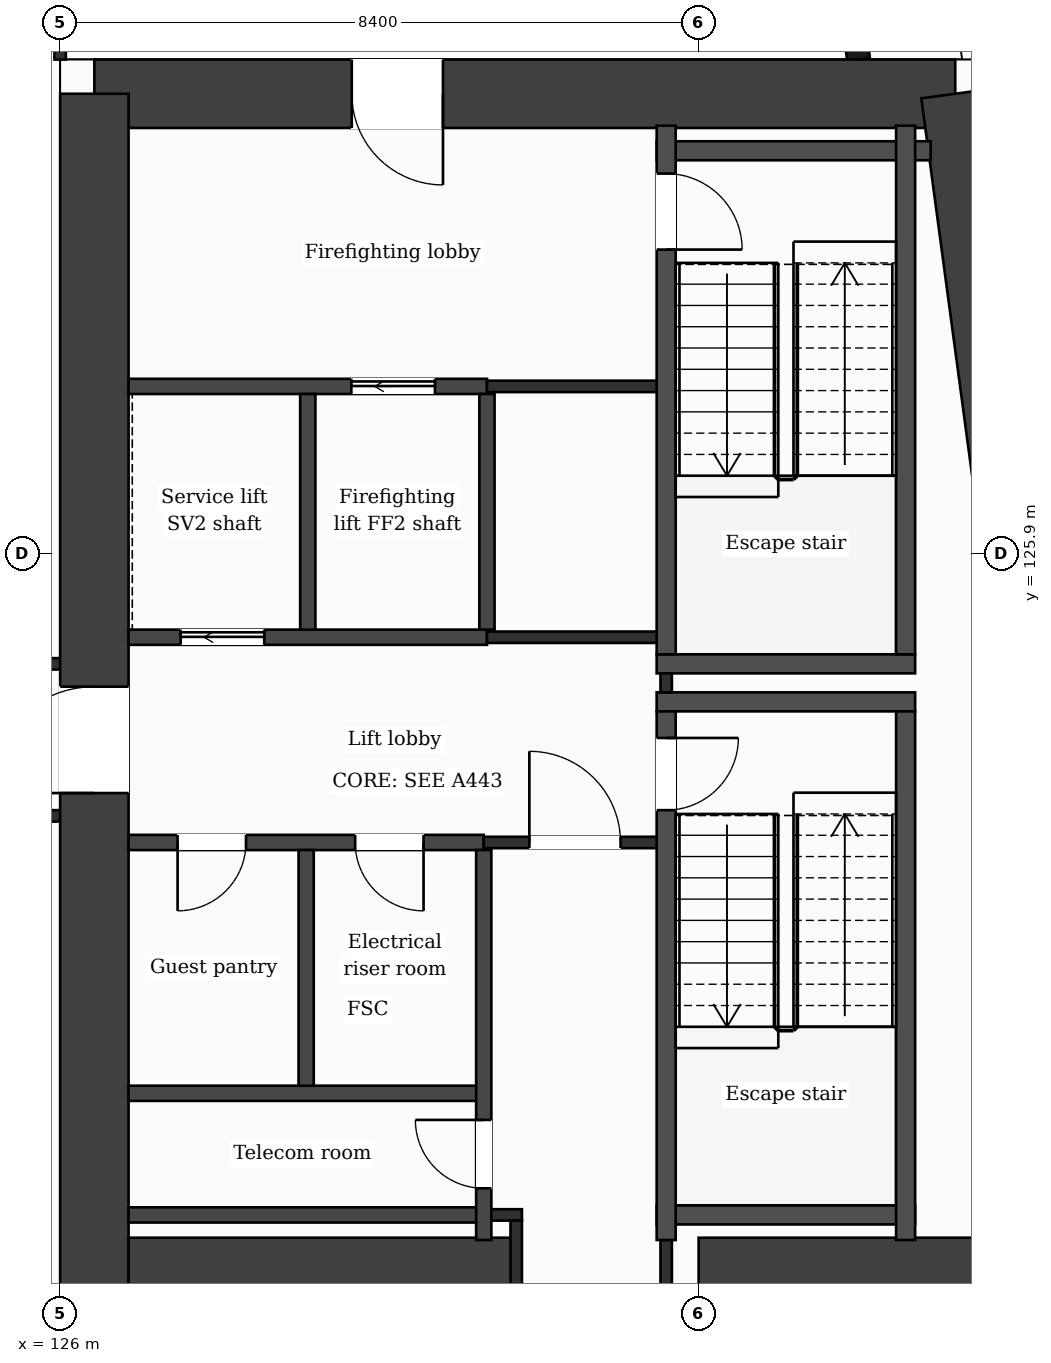
"""IFC4 building model, lengths in metres.
Left out: names, types, materials, properties, quantities, classifications, styles, units other than length and angle.
Written with IfcOpenShell. Run it as: python <this file> out.ifc"""

import sys

from ifc_helpers import new_model, si_unit, direction, frame, frame_2d, origin, place, context, subcontext, project, spatial, rectangle, extrude, element, fill, save


model = new_model("IFC4")
c1 = context("Model", 3, precision=1e-05, world=origin(), true_north=direction((0.0, 1.0)))
c2 = subcontext(c1, "Body", "Model", "MODEL_VIEW")
j1 = project(units=[si_unit("LENGTHUNIT", "METRE"), si_unit("PLANEANGLEUNIT", "RADIAN")], contexts=[c1])
p1 = place(None, origin())
s1 = spatial("IfcSite", under=j1, at=p1, CompositionType="ELEMENT")
p2 = place(p1, origin())
s2 = spatial("IfcBuilding", under=s1, at=p2, CompositionType="ELEMENT")
p3 = place(p2, frame((0.0, 0.0, 177.4)))
s3 = spatial("IfcBuildingStorey", under=s2, at=p3, CompositionType="ELEMENT", Elevation=177.4)
p4 = place(p3, frame((126.45, 131.95, 0.0), z_axis=(0.0, 0.0, 1.0), x_axis=(1.0, 0.0, 0.0)))
e1 = element("IfcWall", 1, at=p4, inside=s3, PredefinedType="SHEAR", context=c2, shape_type="SweptSolid", body=[
    extrude(rectangle(XDim=11.326, YDim=0.9, at=frame_2d((5.663, 0.0))), origin(), (0.0, 0.0, 1.0), 3.7),
])
p5 = place(p4, frame((3.386, 0.0, 0.0)))
e2 = element("IfcOpeningElement", 2, at=p5, cuts=e1, PredefinedType="OPENING", context=c2, shape_type="SweptSolid", body=[
    extrude(rectangle(XDim=1.2, YDim=2.1, at=frame_2d((0.6, 1.05))), frame((0.0, 0.46, 0.0), z_axis=(0.0, -1.0, 0.0), x_axis=(1.0, 0.0, 0.0)), (0.0, 0.0, 1.0), 0.92),
])
p6 = place(p3, frame((137.776, 131.95, 0.0), z_axis=(0.0, 0.0, 1.0), x_axis=(0.133421759112, -0.991059349482, 0.0)))
e3 = element("IfcWall", 3, at=p6, inside=s3, PredefinedType="SHEAR", context=c2, shape_type="SweptSolid", body=[
    extrude(rectangle(XDim=21.29, YDim=0.9, at=frame_2d((10.645, 0.0))), origin(), (0.0, 0.0, 1.0), 3.7),
])
p7 = place(p3, frame((126.45, 110.85, 0.0), z_axis=(0.0, 0.0, 1.0), x_axis=(0.0, 1.0, 0.0)))
e4 = element("IfcWall", 4, at=p7, inside=s3, PredefinedType="SHEAR", context=c2, shape_type="SweptSolid", body=[
    extrude(rectangle(XDim=21.1, YDim=0.9, at=frame_2d((10.55, 0.0))), origin(), (0.0, 0.0, 1.0), 3.7),
])
p8 = place(p7, frame((11.9, 0.0, 0.0)))
e5 = element("IfcOpeningElement", 5, at=p8, cuts=e4, PredefinedType="OPENING", context=c2, shape_type="SweptSolid", body=[
    extrude(rectangle(XDim=1.4, YDim=2.1, at=frame_2d((0.7, 1.05))), frame((0.0, 0.46, 0.0), z_axis=(0.0, -1.0, 0.0), x_axis=(1.0, 0.0, 0.0)), (0.0, 0.0, 1.0), 0.92),
])
p9 = place(p3, frame((126.9, 116.45, 0.0), z_axis=(0.0, 0.0, 1.0), x_axis=(1.0, 0.0, 0.0)))
e6 = element("IfcWall", 6, at=p9, inside=s3, PredefinedType="SHEAR", context=c2, shape_type="SweptSolid", body=[
    extrude(rectangle(XDim=5.1, YDim=0.9, at=frame_2d((2.55, 0.0))), origin(), (0.0, 0.0, 1.0), 3.7),
])
p10 = place(p3, frame((134.4, 116.45, 0.0), z_axis=(0.0, 0.0, 1.0), x_axis=(1.0, 0.0, 0.0)))
e7 = element("IfcWall", 7, at=p10, inside=s3, PredefinedType="SHEAR", context=c2, shape_type="SweptSolid", body=[
    extrude(rectangle(XDim=5.077, YDim=0.9, at=frame_2d((2.539, 0.0))), origin(), (0.0, 0.0, 1.0), 3.7),
])
p11 = place(p3, frame((136.504, 132.4, 0.0), z_axis=(0.0, 0.0, 1.0), x_axis=(-0.133399697462, 0.99106231929, 0.0)))
e8 = element("IfcWall", 8, at=p11, inside=s3, PredefinedType="SOLIDWALL", context=c2, shape_type="SweptSolid", body=[
    extrude(rectangle(XDim=6.74, YDim=0.3, at=frame_2d((3.37, 0.0))), origin(), (0.0, 0.0, 1.0), 3.38),
])
p12 = place(p11, frame((1.115, 0.0, 0.0)))
e9 = element("IfcOpeningElement", 9, at=p12, cuts=e8, PredefinedType="OPENING", context=c2, shape_type="SweptSolid", body=[
    extrude(rectangle(XDim=1.2, YDim=2.4, at=frame_2d((0.6, 1.2))), frame((0.0, 0.16, 0.0), z_axis=(0.0, -1.0, 0.0), x_axis=(1.0, 0.0, 0.0)), (0.0, 0.0, 1.0), 0.32),
])
p13 = place(p11, frame((3.835, 0.0, 0.9)))
e10 = element("IfcOpeningElement", 10, at=p13, cuts=e8, PredefinedType="OPENING", context=c2, shape_type="SweptSolid", body=[
    extrude(rectangle(XDim=2.4, YDim=2.1, at=frame_2d((1.2, 1.05))), frame((0.0, 0.16, 0.0), z_axis=(0.0, -1.0, 0.0), x_axis=(1.0, 0.0, 0.0)), (0.0, 0.0, 1.0), 0.32),
])
p14 = place(p3, frame((126.9, 117.2, 0.0), z_axis=(0.0, 0.0, 1.0), x_axis=(1.0, 0.0, 0.0)))
e11 = element("IfcWall", 11, at=p14, inside=s3, PredefinedType="PARTITIONING", context=c2, shape_type="SweptSolid", body=[
    extrude(rectangle(XDim=4.673, YDim=0.2, at=frame_2d((2.336, 0.0))), origin(), (0.0, 0.0, 1.0), 3.38),
])
p15 = place(p3, frame((131.573, 117.2, 0.0), z_axis=(0.0, 0.0, 1.0), x_axis=(1.0, 0.0, 0.0)))
e12 = element("IfcWall", 12, at=p15, inside=s3, PredefinedType="PARTITIONING", context=c2, shape_type="SweptSolid", body=[
    extrude(rectangle(XDim=0.502, YDim=0.15, at=frame_2d((0.251, 0.0))), origin(), (0.0, 0.0, 1.0), 3.38),
])
p16 = place(p3, frame((133.848, 117.2, 0.0), z_axis=(0.0, 0.0, 1.0), x_axis=(1.0, 0.0, 0.0)))
e13 = element("IfcWall", 13, at=p16, inside=s3, PredefinedType="PARTITIONING", context=c2, shape_type="SweptSolid", body=[
    extrude(rectangle(XDim=3.4, YDim=0.25, at=frame_2d((1.7, 0.0))), origin(), (0.0, 0.0, 1.0), 3.38),
])
p17 = place(p3, frame((126.9, 118.8, 0.0), z_axis=(0.0, 0.0, 1.0), x_axis=(1.0, 0.0, 0.0)))
e14 = element("IfcWall", 14, at=p17, inside=s3, PredefinedType="PARTITIONING", context=c2, shape_type="SweptSolid", body=[
    extrude(rectangle(XDim=4.673, YDim=0.2, at=frame_2d((2.336, 0.0))), origin(), (0.0, 0.0, 1.0), 3.38),
])
p18 = place(p3, frame((126.9, 122.1, 0.0), z_axis=(0.0, 0.0, 1.0), x_axis=(1.0, 0.0, 0.0)))
e15 = element("IfcWall", 15, at=p18, inside=s3, PredefinedType="PARTITIONING", context=c2, shape_type="SweptSolid", body=[
    extrude(rectangle(XDim=4.673, YDim=0.2, at=frame_2d((2.336, 0.0))), origin(), (0.0, 0.0, 1.0), 3.38),
])
p19 = place(p18, frame((2.981, 0.0, 0.0)))
e16 = element("IfcOpeningElement", 16, at=p19, cuts=e15, PredefinedType="OPENING", context=c2, shape_type="SweptSolid", body=[
    extrude(rectangle(XDim=0.9, YDim=2.1, at=frame_2d((0.45, 1.05))), frame((0.0, 0.11, 0.0), z_axis=(0.0, -1.0, 0.0), x_axis=(1.0, 0.0, 0.0)), (0.0, 0.0, 1.0), 0.22),
])
p20 = place(p18, frame((0.645, 0.0, 0.0)))
e17 = element("IfcOpeningElement", 17, at=p20, cuts=e15, PredefinedType="OPENING", context=c2, shape_type="SweptSolid", body=[
    extrude(rectangle(XDim=0.9, YDim=2.1, at=frame_2d((0.45, 1.05))), frame((0.0, 0.11, 0.0), z_axis=(0.0, -1.0, 0.0), x_axis=(1.0, 0.0, 0.0)), (0.0, 0.0, 1.0), 0.22),
])
p21 = place(p3, frame((131.573, 122.1, 0.0), z_axis=(0.0, 0.0, 1.0), x_axis=(1.0, 0.0, 0.0)))
e18 = element("IfcWall", 18, at=p21, inside=s3, PredefinedType="PARTITIONING", context=c2, shape_type="SweptSolid", body=[
    extrude(rectangle(XDim=2.4, YDim=0.15, at=frame_2d((1.2, 0.0))), origin(), (0.0, 0.0, 1.0), 3.38),
])
p22 = place(p21, frame((0.6, 0.0, 0.0)))
e19 = element("IfcOpeningElement", 19, at=p22, cuts=e18, PredefinedType="OPENING", context=c2, shape_type="SweptSolid", body=[
    extrude(rectangle(XDim=1.2, YDim=2.1, at=frame_2d((0.6, 1.05))), frame((0.0, 0.085, 0.0), z_axis=(0.0, -1.0, 0.0), x_axis=(1.0, 0.0, 0.0)), (0.0, 0.0, 1.0), 0.17),
])
p23 = place(p3, frame((100.8, 122.45, 0.0), z_axis=(0.0, 0.0, 1.0), x_axis=(1.0, 0.0, 0.0)))
e20 = element("IfcWall", 20, at=p23, inside=s3, PredefinedType="PARTITIONING", context=c2, shape_type="SweptSolid", body=[
    extrude(rectangle(XDim=25.2, YDim=0.15, at=frame_2d((12.6, 0.0))), origin(), (0.0, 0.0, 1.0), 3.38),
])
for number, where, z_axis, x_axis in (
    (21, (133.848, 123.95, 0.0), (0.0, 0.0, 1.0), (1.0, 0.0, 0.0)),
    (22, (133.848, 124.45, 0.0), (0.0, 0.0, 1.0), (1.0, 0.0, 0.0)),
):
    element("IfcWall", number, at=place(p3, frame(where, z_axis=z_axis, x_axis=x_axis)), inside=s3, PredefinedType="PARTITIONING", context=c2, shape_type="SweptSolid", body=[
        extrude(rectangle(XDim=3.4, YDim=0.25, at=frame_2d((1.7, 0.0))), origin(), (0.0, 0.0, 1.0), 3.38),
    ])
p24 = place(p3, frame((100.8, 124.45, 0.0), z_axis=(0.0, 0.0, 1.0), x_axis=(1.0, 0.0, 0.0)))
e23 = element("IfcWall", 23, at=p24, inside=s3, PredefinedType="PARTITIONING", context=c2, shape_type="SweptSolid", body=[
    extrude(rectangle(XDim=25.2, YDim=0.15, at=frame_2d((12.6, 0.0))), origin(), (0.0, 0.0, 1.0), 3.38),
])
p25 = place(p24, frame((0.975, 0.0, 0.0)))
e24 = element("IfcOpeningElement", 24, at=p25, cuts=e23, PredefinedType="OPENING", context=c2, shape_type="SweptSolid", body=[
    extrude(rectangle(XDim=1.0, YDim=2.1, at=frame_2d((0.5, 1.05))), frame((0.0, 0.085, 0.0), z_axis=(0.0, -1.0, 0.0), x_axis=(1.0, 0.0, 0.0)), (0.0, 0.0, 1.0), 0.17),
])
p26 = place(p24, frame((6.05, 0.0, 0.0)))
e25 = element("IfcOpeningElement", 25, at=p26, cuts=e23, PredefinedType="OPENING", context=c2, shape_type="SweptSolid", body=[
    extrude(rectangle(XDim=1.0, YDim=2.1, at=frame_2d((0.5, 1.05))), frame((0.0, 0.085, 0.0), z_axis=(0.0, -1.0, 0.0), x_axis=(1.0, 0.0, 0.0)), (0.0, 0.0, 1.0), 0.17),
])
p27 = place(p24, frame((9.27, 0.0, 0.0)))
e26 = element("IfcOpeningElement", 26, at=p27, cuts=e23, PredefinedType="OPENING", context=c2, shape_type="SweptSolid", body=[
    extrude(rectangle(XDim=1.0, YDim=2.1, at=frame_2d((0.5, 1.05))), frame((0.0, 0.085, 0.0), z_axis=(0.0, -1.0, 0.0), x_axis=(1.0, 0.0, 0.0)), (0.0, 0.0, 1.0), 0.17),
])
p28 = place(p24, frame((14.2, 0.0, 0.0)))
e27 = element("IfcOpeningElement", 27, at=p28, cuts=e23, PredefinedType="OPENING", context=c2, shape_type="SweptSolid", body=[
    extrude(rectangle(XDim=1.0, YDim=2.1, at=frame_2d((0.5, 1.05))), frame((0.0, 0.085, 0.0), z_axis=(0.0, -1.0, 0.0), x_axis=(1.0, 0.0, 0.0)), (0.0, 0.0, 1.0), 0.17),
])
p29 = place(p24, frame((18.825, 0.0, 0.0)))
e28 = element("IfcOpeningElement", 28, at=p29, cuts=e23, PredefinedType="OPENING", context=c2, shape_type="SweptSolid", body=[
    extrude(rectangle(XDim=1.0, YDim=2.1, at=frame_2d((0.5, 1.05))), frame((0.0, 0.085, 0.0), z_axis=(0.0, -1.0, 0.0), x_axis=(1.0, 0.0, 0.0)), (0.0, 0.0, 1.0), 0.17),
])
p30 = place(p3, frame((126.9, 124.8, 0.0), z_axis=(0.0, 0.0, 1.0), x_axis=(1.0, 0.0, 0.0)))
e29 = element("IfcWall", 29, at=p30, inside=s3, PredefinedType="PARTITIONING", context=c2, shape_type="SweptSolid", body=[
    extrude(rectangle(XDim=4.715, YDim=0.2, at=frame_2d((2.358, 0.0))), origin(), (0.0, 0.0, 1.0), 3.38),
])
p31 = place(p30, frame((0.685, 0.0, 0.0)))
e30 = element("IfcOpeningElement", 30, at=p31, cuts=e29, PredefinedType="OPENING", context=c2, shape_type="SweptSolid", body=[
    extrude(rectangle(XDim=1.1, YDim=2.1, at=frame_2d((0.55, 1.05))), frame((0.0, 0.11, 0.0), z_axis=(0.0, -1.0, 0.0), x_axis=(1.0, 0.0, 0.0)), (0.0, 0.0, 1.0), 0.22),
])
p32 = place(p3, frame((131.615, 124.8, 0.0), z_axis=(0.0, 0.0, 1.0), x_axis=(1.0, 0.0, 0.0)))
e31 = element("IfcWall", 31, at=p32, inside=s3, PredefinedType="PARTITIONING", context=c2, shape_type="SweptSolid", body=[
    extrude(rectangle(XDim=2.483, YDim=0.15, at=frame_2d((1.241, 0.0))), origin(), (0.0, 0.0, 1.0), 3.38),
])
p33 = place(p3, frame((126.9, 128.1, 0.0), z_axis=(0.0, 0.0, 1.0), x_axis=(1.0, 0.0, 0.0)))
e32 = element("IfcWall", 32, at=p33, inside=s3, PredefinedType="PARTITIONING", context=c2, shape_type="SweptSolid", body=[
    extrude(rectangle(XDim=4.715, YDim=0.2, at=frame_2d((2.358, 0.0))), origin(), (0.0, 0.0, 1.0), 3.38),
])
p34 = place(p33, frame((2.931, 0.0, 0.0)))
e33 = element("IfcOpeningElement", 33, at=p34, cuts=e32, PredefinedType="OPENING", context=c2, shape_type="SweptSolid", body=[
    extrude(rectangle(XDim=1.1, YDim=2.1, at=frame_2d((0.55, 1.05))), frame((0.0, 0.11, 0.0), z_axis=(0.0, -1.0, 0.0), x_axis=(1.0, 0.0, 0.0)), (0.0, 0.0, 1.0), 0.22),
])
p35 = place(p3, frame((131.615, 128.1, 0.0), z_axis=(0.0, 0.0, 1.0), x_axis=(1.0, 0.0, 0.0)))
e34 = element("IfcWall", 34, at=p35, inside=s3, PredefinedType="PARTITIONING", context=c2, shape_type="SweptSolid", body=[
    extrude(rectangle(XDim=2.358, YDim=0.15, at=frame_2d((1.179, 0.0))), origin(), (0.0, 0.0, 1.0), 3.38),
])
p36 = place(p3, frame((133.848, 131.2, 0.0), z_axis=(0.0, 0.0, 1.0), x_axis=(1.0, 0.0, 0.0)))
e35 = element("IfcWall", 35, at=p36, inside=s3, PredefinedType="PARTITIONING", context=c2, shape_type="SweptSolid", body=[
    extrude(rectangle(XDim=3.605, YDim=0.25, at=frame_2d((1.802, 0.0))), origin(), (0.0, 0.0, 1.0), 3.38),
])
p37 = place(p3, frame((126.0, 132.4, 0.0), z_axis=(0.0, 0.0, 1.0), x_axis=(0.0, 1.0, 0.0)))
e36 = element("IfcWall", 36, at=p37, inside=s3, PredefinedType="PARTITIONING", context=c2, shape_type="SweptSolid", body=[
    extrude(rectangle(XDim=1.325, YDim=0.15, at=frame_2d((0.663, 0.0))), origin(), (0.0, 0.0, 1.0), 3.38),
])
for number, where, z_axis, x_axis in (
    (37, (129.237, 118.9, 0.0), (0.0, 0.0, 1.0), (0.0, 1.0, 0.0)),
    (38, (129.258, 124.9, 0.0), (0.0, 0.0, 1.0), (0.0, 1.0, 0.0)),
):
    element("IfcWall", number, at=place(p3, frame(where, z_axis=z_axis, x_axis=x_axis)), inside=s3, PredefinedType="PARTITIONING", context=c2, shape_type="SweptSolid", body=[
        extrude(rectangle(XDim=3.1, YDim=0.2, at=frame_2d((1.55, 0.0))), origin(), (0.0, 0.0, 1.0), 3.38),
    ])
p38 = place(p3, frame((131.573, 116.87, 0.0), z_axis=(0.0, 0.0, 1.0), x_axis=(0.0, 1.0, 0.0)))
e39 = element("IfcWall", 39, at=p38, inside=s3, PredefinedType="PARTITIONING", context=c2, shape_type="SweptSolid", body=[
    extrude(rectangle(XDim=5.13, YDim=0.2, at=frame_2d((2.565, 0.0))), origin(), (0.0, 0.0, 1.0), 3.38),
])
p39 = place(p38, frame((0.68, 0.0, 0.0)))
e40 = element("IfcOpeningElement", 40, at=p39, cuts=e39, PredefinedType="OPENING", context=c2, shape_type="SweptSolid", body=[
    extrude(rectangle(XDim=0.9, YDim=2.1, at=frame_2d((0.45, 1.05))), frame((0.0, 0.11, 0.0), z_axis=(0.0, -1.0, 0.0), x_axis=(1.0, 0.0, 0.0)), (0.0, 0.0, 1.0), 0.22),
])
p40 = place(p3, frame((131.615, 124.9, 0.0), z_axis=(0.0, 0.0, 1.0), x_axis=(0.0, 1.0, 0.0)))
e41 = element("IfcWall", 41, at=p40, inside=s3, PredefinedType="PARTITIONING", context=c2, shape_type="SweptSolid", body=[
    extrude(rectangle(XDim=3.1, YDim=0.2, at=frame_2d((1.55, 0.0))), origin(), (0.0, 0.0, 1.0), 3.38),
])
p41 = place(p3, frame((132.0, 116.0, 0.0), z_axis=(0.0, 0.0, 1.0), x_axis=(0.0, 1.0, 0.0)))
e42 = element("IfcWall", 42, at=p41, inside=s3, PredefinedType="PARTITIONING", context=c2, shape_type="SweptSolid", body=[
    extrude(rectangle(XDim=1.125, YDim=0.15, at=frame_2d((0.562, 0.0))), origin(), (0.0, 0.0, 1.0), 3.38),
])
p42 = place(p3, frame((133.973, 116.0, 0.0), z_axis=(0.0, 0.0, 1.0), x_axis=(0.0, 1.0, 0.0)))
e43 = element("IfcWall", 43, at=p42, inside=s3, PredefinedType="PARTITIONING", context=c2, shape_type="SweptSolid", body=[
    extrude(rectangle(XDim=0.87, YDim=0.15, at=frame_2d((0.435, 0.0))), origin(), (0.0, 0.0, 1.0), 3.38),
])
p43 = place(p3, frame((133.973, 124.075, 0.0), z_axis=(0.0, 0.0, 1.0), x_axis=(0.0, 1.0, 0.0)))
e44 = element("IfcWall", 44, at=p43, inside=s3, PredefinedType="PARTITIONING", context=c2, shape_type="SweptSolid", body=[
    extrude(rectangle(XDim=0.25, YDim=0.15, at=frame_2d((0.125, 0.0))), origin(), (0.0, 0.0, 1.0), 3.38),
])
p44 = place(p3, frame((133.973, 116.87, 0.0), z_axis=(0.0, 0.0, 1.0), x_axis=(0.0, 1.0, 0.0)))
e45 = element("IfcWall", 45, at=p44, inside=s3, PredefinedType="PARTITIONING", context=c2, shape_type="SweptSolid", body=[
    extrude(rectangle(XDim=6.955, YDim=0.25, at=frame_2d((3.478, 0.0))), origin(), (0.0, 0.0, 1.0), 3.38),
])
p45 = place(p44, frame((5.655, 0.0, 0.0)))
e46 = element("IfcOpeningElement", 46, at=p45, cuts=e45, PredefinedType="OPENING", context=c2, shape_type="SweptSolid", body=[
    extrude(rectangle(XDim=0.95, YDim=2.1, at=frame_2d((0.475, 1.05))), frame((0.0, 0.135, 0.0), z_axis=(0.0, -1.0, 0.0), x_axis=(1.0, 0.0, 0.0)), (0.0, 0.0, 1.0), 0.27),
])
p46 = place(p3, frame((133.973, 124.575, 0.0), z_axis=(0.0, 0.0, 1.0), x_axis=(0.0, 1.0, 0.0)))
e47 = element("IfcWall", 47, at=p46, inside=s3, PredefinedType="PARTITIONING", context=c2, shape_type="SweptSolid", body=[
    extrude(rectangle(XDim=6.955, YDim=0.25, at=frame_2d((3.478, 0.0))), origin(), (0.0, 0.0, 1.0), 3.38),
])
p47 = place(p46, frame((5.325, 0.0, 0.0)))
e48 = element("IfcOpeningElement", 48, at=p47, cuts=e47, PredefinedType="OPENING", context=c2, shape_type="SweptSolid", body=[
    extrude(rectangle(XDim=1.0, YDim=2.1, at=frame_2d((0.5, 1.05))), frame((0.0, 0.135, 0.0), z_axis=(0.0, -1.0, 0.0), x_axis=(1.0, 0.0, 0.0)), (0.0, 0.0, 1.0), 0.27),
])
p48 = place(p3, frame((137.123, 116.87, 0.0), z_axis=(0.0, 0.0, 1.0), x_axis=(0.0, 1.0, 0.0)))
e49 = element("IfcWall", 49, at=p48, inside=s3, PredefinedType="PARTITIONING", context=c2, shape_type="SweptSolid", body=[
    extrude(rectangle(XDim=6.955, YDim=0.25, at=frame_2d((3.478, 0.0))), origin(), (0.0, 0.0, 1.0), 3.38),
])
p49 = place(p3, frame((137.123, 124.575, 0.0), z_axis=(0.0, 0.0, 1.0), x_axis=(0.0, 1.0, 0.0)))
e50 = element("IfcWall", 50, at=p49, inside=s3, PredefinedType="PARTITIONING", context=c2, shape_type="SweptSolid", body=[
    extrude(rectangle(XDim=6.955, YDim=0.25, at=frame_2d((3.478, 0.0))), origin(), (0.0, 0.0, 1.0), 3.38),
])
p50 = place(p22, origin())
e51 = element("IfcDoor", 51, at=p50, inside=s3, OperationType="SINGLE_SWING_LEFT", PredefinedType="DOOR", context=c2, shape_type="SweptSolid", body=[
    extrude(rectangle(XDim=1.2, YDim=2.1, at=frame_2d((0.6, 1.05))), frame((0.0, 0.025, 0.0), z_axis=(0.0, -1.0, 0.0), x_axis=(1.0, 0.0, 0.0)), (0.0, 0.0, 1.0), 0.05),
])
fill(e19, e51)
p51 = place(p34, origin())
e52 = element("IfcDoor", 52, at=p51, inside=s3, OperationType="SLIDING_TO_LEFT", PredefinedType="DOOR", context=c2, shape_type="SweptSolid", body=[
    extrude(rectangle(XDim=1.1, YDim=2.1, at=frame_2d((0.55, 1.05))), frame((0.0, 0.025, 0.0), z_axis=(0.0, -1.0, 0.0), x_axis=(1.0, 0.0, 0.0)), (0.0, 0.0, 1.0), 0.05),
])
fill(e33, e52)
p52 = place(p31, origin())
e53 = element("IfcDoor", 53, at=p52, inside=s3, OperationType="SLIDING_TO_LEFT", PredefinedType="DOOR", context=c2, shape_type="SweptSolid", body=[
    extrude(rectangle(XDim=1.1, YDim=2.1, at=frame_2d((0.55, 1.05))), frame((0.0, 0.025, 0.0), z_axis=(0.0, -1.0, 0.0), x_axis=(1.0, 0.0, 0.0)), (0.0, 0.0, 1.0), 0.05),
])
fill(e30, e53)
p53 = place(p19, origin())
e54 = element("IfcDoor", 54, at=p53, inside=s3, OperationType="SINGLE_SWING_RIGHT", PredefinedType="DOOR", context=c2, shape_type="SweptSolid", body=[
    extrude(rectangle(XDim=0.9, YDim=2.1, at=frame_2d((0.45, 1.05))), frame((0.0, 0.025, 0.0), z_axis=(0.0, -1.0, 0.0), x_axis=(1.0, 0.0, 0.0)), (0.0, 0.0, 1.0), 0.05),
])
fill(e16, e54)
p54 = place(p20, origin())
e55 = element("IfcDoor", 55, at=p54, inside=s3, OperationType="SINGLE_SWING_LEFT", PredefinedType="DOOR", context=c2, shape_type="SweptSolid", body=[
    extrude(rectangle(XDim=0.9, YDim=2.1, at=frame_2d((0.45, 1.05))), frame((0.0, 0.025, 0.0), z_axis=(0.0, -1.0, 0.0), x_axis=(1.0, 0.0, 0.0)), (0.0, 0.0, 1.0), 0.05),
])
fill(e17, e55)
p55 = place(p45, origin())
e56 = element("IfcDoor", 56, at=p55, inside=s3, OperationType="SINGLE_SWING_RIGHT", PredefinedType="DOOR", context=c2, shape_type="SweptSolid", body=[
    extrude(rectangle(XDim=0.95, YDim=2.1, at=frame_2d((0.475, 1.05))), frame((0.0, 0.025, 0.0), z_axis=(0.0, -1.0, 0.0), x_axis=(1.0, 0.0, 0.0)), (0.0, 0.0, 1.0), 0.05),
])
fill(e46, e56)
p56 = place(p47, origin())
e57 = element("IfcDoor", 57, at=p56, inside=s3, OperationType="SINGLE_SWING_LEFT", PredefinedType="DOOR", context=c2, shape_type="SweptSolid", body=[
    extrude(rectangle(XDim=1.0, YDim=2.1, at=frame_2d((0.5, 1.05))), frame((0.0, 0.025, 0.0), z_axis=(0.0, -1.0, 0.0), x_axis=(1.0, 0.0, 0.0)), (0.0, 0.0, 1.0), 0.05),
])
fill(e48, e57)
p57 = place(p39, origin())
e58 = element("IfcDoor", 58, at=p57, inside=s3, OperationType="SINGLE_SWING_RIGHT", PredefinedType="DOOR", context=c2, shape_type="SweptSolid", body=[
    extrude(rectangle(XDim=0.9, YDim=2.1, at=frame_2d((0.45, 1.05))), frame((0.0, 0.025, 0.0), z_axis=(0.0, -1.0, 0.0), x_axis=(1.0, 0.0, 0.0)), (0.0, 0.0, 1.0), 0.05),
])
fill(e40, e58)
p58 = place(p5, origin())
e59 = element("IfcDoor", 59, at=p58, inside=s3, OperationType="SINGLE_SWING_RIGHT", PredefinedType="DOOR", context=c2, shape_type="SweptSolid", body=[
    extrude(rectangle(XDim=1.2, YDim=2.1, at=frame_2d((0.6, 1.05))), frame((0.0, 0.025, 0.0), z_axis=(0.0, -1.0, 0.0), x_axis=(1.0, 0.0, 0.0)), (0.0, 0.0, 1.0), 0.05),
])
fill(e2, e59)
p59 = place(p8, origin())
e60 = element("IfcDoor", 60, at=p59, inside=s3, OperationType="SINGLE_SWING_LEFT", PredefinedType="DOOR", context=c2, shape_type="SweptSolid", body=[
    extrude(rectangle(XDim=1.4, YDim=2.1, at=frame_2d((0.7, 1.05))), frame((0.0, 0.025, 0.0), z_axis=(0.0, -1.0, 0.0), x_axis=(1.0, 0.0, 0.0)), (0.0, 0.0, 1.0), 0.05),
])
fill(e5, e60)
save(model, sys.argv[1])
